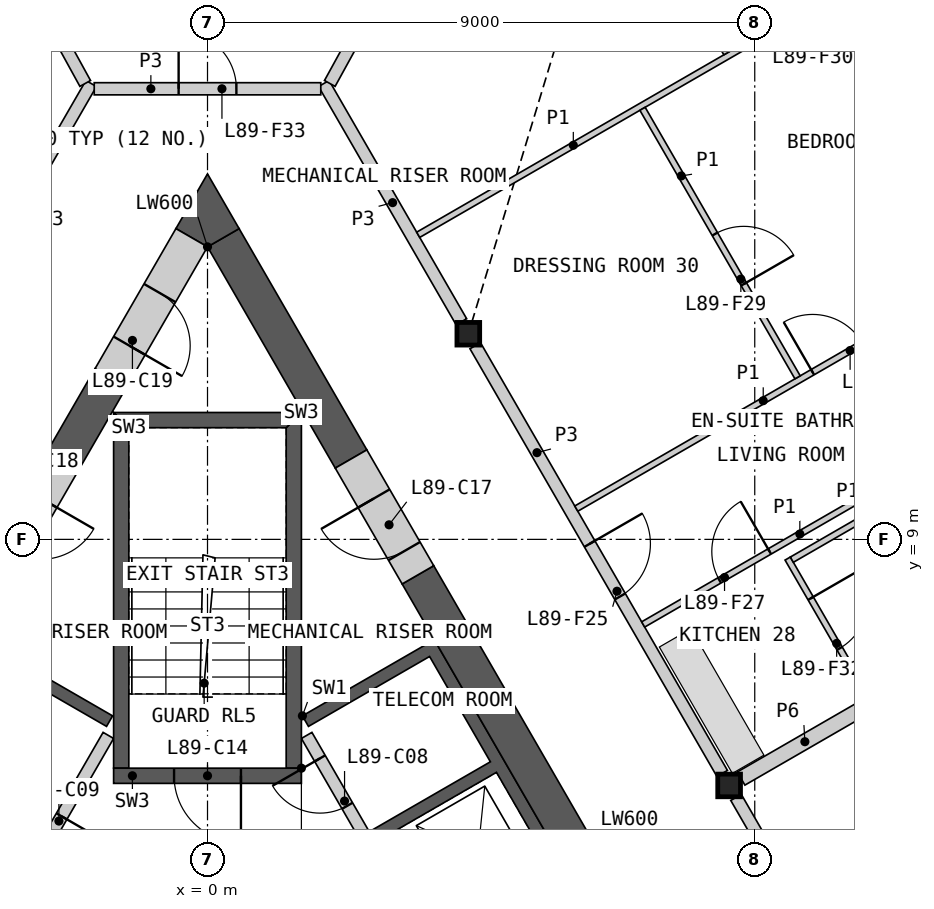
"""IFC4 building model, lengths in metres.
Left out: names, types, materials, properties, quantities, classifications, styles, units other than length and angle.
Written with IfcOpenShell. Run it as: python <this file> out.ifc"""

import sys

from ifc_helpers import new_model, si_unit, direction, frame, frame_2d, origin, origin_2d, place, context, subcontext, project, spatial, polyline, rectangle, i_section, outline, extrude, element, fill, save


model = new_model("IFC4")
c1 = context("Model", 3, precision=1e-05, world=origin(), true_north=direction((0.0, 1.0)))
c2 = subcontext(c1, "Body", "Model", "MODEL_VIEW")
j1 = project(units=[si_unit("LENGTHUNIT", "METRE"), si_unit("PLANEANGLEUNIT", "RADIAN")], contexts=[c1])
p1 = place(None, origin())
s1 = spatial("IfcSite", under=j1, at=p1, CompositionType="ELEMENT")
p2 = place(p1, origin())
s2 = spatial("IfcBuilding", under=s1, at=p2, CompositionType="ELEMENT")
p3 = place(p2, frame((0.0, 0.0, 391.6)))
s3 = spatial("IfcBuildingStorey", under=s2, at=p3, CompositionType="ELEMENT", Elevation=391.6)
for number, where, z_axis, x_axis in (
    (1, (8.578, 4.953, 0.0), (0.0, 0.0, 1.0), (1.0, 0.0, 0.0)),
    (2, (4.289, 12.382, 0.0), (0.0, 0.0, 1.0), (1.0, 0.0, 0.0)),
):
    element("IfcColumn", number, at=place(p3, frame(where, z_axis=z_axis, x_axis=x_axis)), inside=s3, PredefinedType="COLUMN", context=c2, shape_type="SweptSolid", body=[
        extrude(i_section(OverallWidth=0.374, OverallDepth=0.372, WebThickness=0.016, FlangeThickness=0.026, at=origin_2d()), origin(), (0.0, 0.0, 1.0), 3.4),
    ])
p4 = place(p3, origin())
e3 = element("IfcWall", 3, at=p4, inside=s3, PredefinedType="SHEAR", context=c2, shape_type="SweptSolid", body=[
    extrude(outline(polyline([(1.561, 6.097), (3.731, 7.35), (8.231, -0.444), (6.061, -1.697), (5.96, -1.524), (7.952, -0.374), (6.952, 1.358), (4.96, 0.208), (4.861, 0.381), (6.852, 1.531), (5.852, 3.263), (3.861, 2.113), (3.76, 2.287), (5.752, 3.437), (4.752, 5.169), (2.76, 4.019), (2.66, 4.192), (4.652, 5.342), (3.652, 7.074), (1.66, 5.924), (1.561, 6.097)])), origin(), (0.0, 0.0, 1.0), 3.1),
])
p5 = place(p3, frame((5.817, -1.476, 0.0), z_axis=(0.0, 0.0, 1.0), x_axis=(-0.500002616675, 0.866023893041, 0.0)))
e4 = element("IfcWall", 4, at=p5, inside=s3, PredefinedType="SOLIDWALL", context=c2, shape_type="SweptSolid", body=[
    extrude(rectangle(XDim=8.373, YDim=0.2, at=frame_2d((4.187, 0.0))), origin(), (0.0, 0.0, 1.0), 3.1),
])
p6 = place(p5, frame((0.337, 0.0, 0.0)))
e5 = element("IfcOpeningElement", 5, at=p6, cuts=e4, PredefinedType="OPENING", context=c2, shape_type="SweptSolid", body=[
    extrude(rectangle(XDim=1.1, YDim=2.1, at=frame_2d((0.55, 1.05))), frame((0.0, 0.11, 0.0), z_axis=(0.0, -1.0, 0.0), x_axis=(1.0, 0.0, 0.0)), (0.0, 0.0, 1.0), 0.22),
])
p7 = place(p5, frame((2.537, 0.0, 0.0)))
e6 = element("IfcOpeningElement", 6, at=p7, cuts=e4, PredefinedType="OPENING", context=c2, shape_type="SweptSolid", body=[
    extrude(rectangle(XDim=1.1, YDim=2.1, at=frame_2d((0.55, 1.05))), frame((0.0, 0.11, 0.0), z_axis=(0.0, -1.0, 0.0), x_axis=(1.0, 0.0, 0.0)), (0.0, 0.0, 1.0), 0.22),
])
p8 = place(p5, frame((4.737, 0.0, 0.0)))
e7 = element("IfcOpeningElement", 7, at=p8, cuts=e4, PredefinedType="OPENING", context=c2, shape_type="SweptSolid", body=[
    extrude(rectangle(XDim=1.1, YDim=2.1, at=frame_2d((0.55, 1.05))), frame((0.0, 0.11, 0.0), z_axis=(0.0, -1.0, 0.0), x_axis=(1.0, 0.0, 0.0)), (0.0, 0.0, 1.0), 0.22),
])
p9 = place(p5, frame((7.037, 0.0, 0.0)))
e8 = element("IfcOpeningElement", 8, at=p9, cuts=e4, PredefinedType="OPENING", context=c2, shape_type="SweptSolid", body=[
    extrude(rectangle(XDim=0.9, YDim=2.1, at=frame_2d((0.45, 1.05))), frame((0.0, 0.11, 0.0), z_axis=(0.0, -1.0, 0.0), x_axis=(1.0, 0.0, 0.0)), (0.0, 0.0, 1.0), 0.22),
])
p10 = place(p3, origin())
e9 = element("IfcWall", 9, at=p10, inside=s3, PredefinedType="SHEAR", context=c2, shape_type="SweptSolid", body=[
    extrude(outline(polyline([(-4.96, 0.208), (-7.131, 1.461), (-3.731, 7.35), (-1.561, 6.097), (-1.66, 5.924), (-3.652, 7.074), (-5.752, 3.437), (-3.76, 2.287), (-3.861, 2.113), (-5.852, 3.263), (-6.852, 1.531), (-4.861, 0.381), (-4.96, 0.208)])), origin(), (0.0, 0.0, 1.0), 3.1),
])
p11 = place(p3, frame((-1.631, 5.776, 0.0), z_axis=(0.0, 0.0, 1.0), x_axis=(-0.499992876559, -0.866029516466, 0.0)))
e10 = element("IfcWall", 10, at=p11, inside=s3, PredefinedType="SOLIDWALL", context=c2, shape_type="SweptSolid", body=[
    extrude(rectangle(XDim=6.486, YDim=0.2, at=frame_2d((3.243, 0.0))), origin(), (0.0, 0.0, 1.0), 3.1),
])
p12 = place(p11, frame((1.537, 0.0, 0.0)))
e11 = element("IfcOpeningElement", 11, at=p12, cuts=e10, PredefinedType="OPENING", context=c2, shape_type="SweptSolid", body=[
    extrude(rectangle(XDim=0.9, YDim=2.1, at=frame_2d((0.45, 1.05))), frame((0.0, 0.11, 0.0), z_axis=(0.0, -1.0, 0.0), x_axis=(1.0, 0.0, 0.0)), (0.0, 0.0, 1.0), 0.22),
])
p13 = place(p11, frame((4.837, 0.0, 0.0)))
e12 = element("IfcOpeningElement", 12, at=p13, cuts=e10, PredefinedType="OPENING", context=c2, shape_type="SweptSolid", body=[
    extrude(rectangle(XDim=0.9, YDim=2.1, at=frame_2d((0.45, 1.05))), frame((0.0, 0.11, 0.0), z_axis=(0.0, -1.0, 0.0), x_axis=(1.0, 0.0, 0.0)), (0.0, 0.0, 1.0), 0.22),
])
p14 = place(p3, origin())
e13 = element("IfcWall", 13, at=p14, inside=s3, PredefinedType="SHEAR", context=c2, shape_type="SweptSolid", body=[
    extrude(outline(polyline([(1.544, 5.237), (1.544, 11.087), (1.294, 10.837), (1.294, 5.237), (1.544, 5.237)])), origin(), (0.0, 0.0, 1.0), 3.1),
])
p15 = place(p3, origin())
e14 = element("IfcWall", 14, at=p15, inside=s3, PredefinedType="SHEAR", context=c2, shape_type="SweptSolid", body=[
    extrude(outline(polyline([(1.544, 11.087), (-1.544, 11.087), (-1.294, 10.837), (1.294, 10.837), (1.544, 11.087)])), origin(), (0.0, 0.0, 1.0), 3.1),
])
p16 = place(p3, origin())
e15 = element("IfcWall", 15, at=p16, inside=s3, PredefinedType="SHEAR", context=c2, shape_type="SweptSolid", body=[
    extrude(outline(polyline([(-1.294, 10.837), (-1.544, 11.087), (-1.544, 5.237), (-1.294, 5.237), (-1.294, 10.837)])), origin(), (0.0, 0.0, 1.0), 3.1),
])
p17 = place(p3, frame((1.544, 5.112, 0.0), z_axis=(0.0, 0.0, 1.0), x_axis=(-1.0, 0.0, 0.0)))
e16 = element("IfcWall", 16, at=p17, inside=s3, PredefinedType="SHEAR", context=c2, shape_type="SweptSolid", body=[
    extrude(rectangle(XDim=3.088, YDim=0.25, at=frame_2d((1.544, 0.0))), origin(), (0.0, 0.0, 1.0), 3.1),
])
p18 = place(p17, frame((0.994, 0.0, 0.0)))
e17 = element("IfcOpeningElement", 17, at=p18, cuts=e16, PredefinedType="OPENING", context=c2, shape_type="SweptSolid", body=[
    extrude(rectangle(XDim=1.1, YDim=2.1, at=frame_2d((0.55, 1.05))), frame((0.0, 0.135, 0.0), z_axis=(0.0, -1.0, 0.0), x_axis=(1.0, 0.0, 0.0)), (0.0, 0.0, 1.0), 0.27),
])
p19 = place(p3, frame((8.686, -0.634, 0.0), z_axis=(0.0, 0.0, 1.0), x_axis=(-0.50001836461, 0.866014800712, 0.0)))
e18 = element("IfcWall", 18, at=p19, inside=s3, PredefinedType="SHEAR", context=c2, shape_type="SweptSolid", body=[
    extrude(rectangle(XDim=10.451, YDim=0.6, at=frame_2d((5.225, 0.0))), origin(), (0.0, 0.0, 1.0), 3.1),
])
p20 = place(p3, frame((2.361, 10.322, 0.0), z_axis=(0.0, 0.0, 1.0), x_axis=(-0.500000735859, 0.866024978935, 0.0)))
e19 = element("IfcWall", 19, at=p20, inside=s3, PredefinedType="SHEAR", context=c2, shape_type="SweptSolid", body=[
    extrude(rectangle(XDim=4.202, YDim=0.6, at=frame_2d((2.101, 0.0))), origin(), (0.0, 0.0, 1.0), 3.1),
])
p21 = place(p3, frame((-1.59, 11.658, 0.0), z_axis=(0.0, 0.0, 1.0), x_axis=(-0.500037594623, -0.866003697431, 0.0)))
e20 = element("IfcWall", 20, at=p21, inside=s3, PredefinedType="SHEAR", context=c2, shape_type="SweptSolid", body=[
    extrude(rectangle(XDim=1.542, YDim=0.6, at=frame_2d((0.771, 0.0))), origin(), (0.0, 0.0, 1.0), 3.1),
])
p22 = place(p3, origin())
e21 = element("IfcWall", 21, at=p22, inside=s3, PredefinedType="SHEAR", context=c2, shape_type="SweptSolid", body=[
    extrude(outline(polyline([(0.0, 13.811), (-0.52, 14.111), (0.0, 15.011), (0.52, 14.111), (0.0, 13.811)])), origin(), (0.0, 0.0, 1.0), 3.1),
])
p23 = place(p3, frame((3.461, 8.417, 0.0), z_axis=(0.0, 0.0, 1.0), x_axis=(-0.499946605688, 0.86605622881, 0.0)))
e22 = element("IfcWall", 22, at=p23, inside=s3, PredefinedType="SHEAR", context=c2, shape_type="SweptSolid", body=[
    extrude(rectangle(XDim=2.2, YDim=0.6, at=frame_2d((1.1, 0.0))), origin(), (0.0, 0.0, 1.0), 3.1),
])
p24 = place(p23, frame((0.45, 0.0, 0.0)))
e23 = element("IfcOpeningElement", 23, at=p24, cuts=e22, PredefinedType="OPENING", context=c2, shape_type="SweptSolid", body=[
    extrude(rectangle(XDim=1.0, YDim=2.1, at=frame_2d((0.5, 1.05))), frame((0.0, 0.31, 0.0), z_axis=(0.0, -1.0, 0.0), x_axis=(1.0, 0.0, 0.0)), (0.0, 0.0, 1.0), 0.62),
])
p25 = place(p3, frame((-2.361, 10.322, 0.0), z_axis=(0.0, 0.0, 1.0), x_axis=(-0.499946605688, -0.86605622881, 0.0)))
e24 = element("IfcWall", 24, at=p25, inside=s3, PredefinedType="SHEAR", context=c2, shape_type="SweptSolid", body=[
    extrude(rectangle(XDim=2.2, YDim=0.6, at=frame_2d((1.1, 0.0))), origin(), (0.0, 0.0, 1.0), 3.1),
])
p26 = place(p25, frame((0.75, 0.0, 0.0)))
e25 = element("IfcOpeningElement", 25, at=p26, cuts=e24, PredefinedType="OPENING", context=c2, shape_type="SweptSolid", body=[
    extrude(rectangle(XDim=1.0, YDim=2.1, at=frame_2d((0.5, 1.05))), frame((0.0, 0.31, 0.0), z_axis=(0.0, -1.0, 0.0), x_axis=(1.0, 0.0, 0.0)), (0.0, 0.0, 1.0), 0.62),
])
p27 = place(p3, frame((-0.26, 13.961, 0.0), z_axis=(0.0, 0.0, 1.0), x_axis=(-0.49997936161, -0.866037319036, 0.0)))
e26 = element("IfcWall", 26, at=p27, inside=s3, PredefinedType="SHEAR", context=c2, shape_type="SweptSolid", body=[
    extrude(rectangle(XDim=2.66, YDim=0.6, at=frame_2d((1.33, 0.0))), origin(), (0.0, 0.0, 1.0), 3.1),
])
p28 = place(p27, frame((1.05, 0.0, 0.0)))
e27 = element("IfcOpeningElement", 27, at=p28, cuts=e26, PredefinedType="OPENING", context=c2, shape_type="SweptSolid", body=[
    extrude(rectangle(XDim=1.0, YDim=2.1, at=frame_2d((0.5, 1.05))), frame((0.0, 0.31, 0.0), z_axis=(0.0, -1.0, 0.0), x_axis=(1.0, 0.0, 0.0)), (0.0, 0.0, 1.0), 0.62),
])
p29 = place(p3, frame((4.403, 12.185, 0.0), z_axis=(0.0, 0.0, 1.0), x_axis=(0.499992155518, -0.866029932751, 0.0)))
e28 = element("IfcWall", 28, at=p29, inside=s3, PredefinedType="PARTITIONING", context=c2, shape_type="SweptSolid", body=[
    extrude(rectangle(XDim=8.123, YDim=0.2, at=frame_2d((4.062, 0.0))), origin(), (0.0, 0.0, 1.0), 3.1),
])
p30 = place(p29, frame((3.762, 0.0, 0.0)))
e29 = element("IfcOpeningElement", 29, at=p30, cuts=e28, PredefinedType="OPENING", context=c2, shape_type="SweptSolid", body=[
    extrude(rectangle(XDim=1.0, YDim=2.1, at=frame_2d((0.5, 1.05))), frame((0.0, 0.11, 0.0), z_axis=(0.0, -1.0, 0.0), x_axis=(1.0, 0.0, 0.0)), (0.0, 0.0, 1.0), 0.22),
])
p31 = place(p3, frame((8.692, 4.756, 0.0), z_axis=(0.0, 0.0, 1.0), x_axis=(0.500001682468, -0.866024432409, 0.0)))
e30 = element("IfcWall", 30, at=p31, inside=s3, PredefinedType="PARTITIONING", context=c2, shape_type="SweptSolid", body=[
    extrude(rectangle(XDim=8.124, YDim=0.2, at=frame_2d((4.062, 0.0))), origin(), (0.0, 0.0, 1.0), 3.1),
])
p32 = place(p31, frame((1.956, 0.0, 0.0)))
e31 = element("IfcOpeningElement", 31, at=p32, cuts=e30, PredefinedType="OPENING", context=c2, shape_type="SweptSolid", body=[
    extrude(rectangle(XDim=1.0, YDim=2.1, at=frame_2d((0.5, 1.05))), frame((0.0, 0.11, 0.0), z_axis=(0.0, -1.0, 0.0), x_axis=(1.0, 0.0, 0.0)), (0.0, 0.0, 1.0), 0.22),
])
for number, where, z_axis, x_axis in (
    (32, (-4.176, 12.579, 0.0), (0.0, 0.0, 1.0), (0.5, 0.866, 0.0)),
    (33, (1.913, 16.498, 0.0), (0.0, 0.0, 1.0), (0.5, -0.866, 0.0)),
):
    element("IfcWall", number, at=place(p3, frame(where, z_axis=z_axis, x_axis=x_axis)), inside=s3, PredefinedType="PARTITIONING", context=c2, shape_type="SweptSolid", body=[
        extrude(rectangle(XDim=4.525, YDim=0.2, at=frame_2d((2.263, 0.0))), origin(), (0.0, 0.0, 1.0), 3.1),
    ])
p33 = place(p3, frame((-1.863, 16.411, 0.0), z_axis=(0.0, 0.0, 1.0), x_axis=(1.0, 0.0, 0.0)))
e34 = element("IfcWall", 34, at=p33, inside=s3, PredefinedType="PARTITIONING", context=c2, shape_type="SweptSolid", body=[
    extrude(rectangle(XDim=3.726, YDim=0.2, at=frame_2d((1.863, 0.0))), origin(), (0.0, 0.0, 1.0), 3.1),
])
p34 = place(p33, frame((1.388, 0.0, 0.0)))
e35 = element("IfcOpeningElement", 35, at=p34, cuts=e34, PredefinedType="OPENING", context=c2, shape_type="SweptSolid", body=[
    extrude(rectangle(XDim=0.95, YDim=2.1, at=frame_2d((0.475, 1.05))), frame((0.0, 0.11, 0.0), z_axis=(0.0, -1.0, 0.0), x_axis=(1.0, 0.0, 0.0)), (0.0, 0.0, 1.0), 0.22),
])
p35 = place(p3, frame((8.775, 5.066, 0.0), z_axis=(0.0, 0.0, 1.0), x_axis=(0.865989219354, 0.500062668036, 0.0)))
e36 = element("IfcWall", 36, at=p35, inside=s3, PredefinedType="PARTITIONING", context=c2, shape_type="SweptSolid", body=[
    extrude(rectangle(XDim=2.423, YDim=0.25, at=frame_2d((1.211, 0.0))), origin(), (0.0, 0.0, 1.0), 2.33),
])
p36 = place(p3, frame((-8.581, 28.455, 0.0), z_axis=(0.0, 0.0, 1.0), x_axis=(0.481551865547, -0.876417594979, 0.0)))
e37 = element("IfcWall", 37, at=p36, inside=s3, PredefinedType="PARTITIONING", context=c2, shape_type="SweptSolid", body=[
    extrude(rectangle(XDim=13.643, YDim=0.2, at=frame_2d((6.821, 0.0))), origin(), (0.0, 0.0, 1.0), 2.33),
])
p37 = place(p3, frame((2.011, 16.499, 0.0), z_axis=(0.0, 0.0, 1.0), x_axis=(0.481548701843, 0.876419333284, 0.0)))
e38 = element("IfcWall", 38, at=p37, inside=s3, PredefinedType="PARTITIONING", context=c2, shape_type="SweptSolid", body=[
    extrude(rectangle(XDim=14.032, YDim=0.2, at=frame_2d((7.016, 0.0))), origin(), (0.0, 0.0, 1.0), 2.33),
])
p38 = place(p3, frame((3.465, 14.01, 0.0), z_axis=(0.0, 0.0, 1.0), x_axis=(0.866032376801, 0.499987922186, 0.0)))
e39 = element("IfcWall", 39, at=p38, inside=s3, PredefinedType="PARTITIONING", context=c2, shape_type="SweptSolid", body=[
    extrude(rectangle(XDim=11.782, YDim=0.1, at=frame_2d((5.891, 0.0))), origin(), (0.0, 0.0, 1.0), 2.33),
])
p39 = place(p38, frame((6.168, 0.0, 0.0)))
e40 = element("IfcOpeningElement", 40, at=p39, cuts=e39, PredefinedType="OPENING", context=c2, shape_type="SweptSolid", body=[
    extrude(rectangle(XDim=0.95, YDim=2.1, at=frame_2d((0.475, 1.05))), frame((0.0, 0.06, 0.0), z_axis=(0.0, -1.0, 0.0), x_axis=(1.0, 0.0, 0.0)), (0.0, 0.0, 1.0), 0.12),
])
p40 = place(p3, frame((6.065, 9.506, 0.0), z_axis=(0.0, 0.0, 1.0), x_axis=(0.866018949465, 0.500011179042, 0.0)))
e41 = element("IfcWall", 41, at=p40, inside=s3, PredefinedType="PARTITIONING", context=c2, shape_type="SweptSolid", body=[
    extrude(rectangle(XDim=7.1, YDim=0.1, at=frame_2d((3.55, 0.0))), origin(), (0.0, 0.0, 1.0), 2.33),
])
p41 = place(p40, frame((4.488, 0.0, 0.0)))
e42 = element("IfcOpeningElement", 42, at=p41, cuts=e41, PredefinedType="OPENING", context=c2, shape_type="SweptSolid", body=[
    extrude(rectangle(XDim=0.95, YDim=2.1, at=frame_2d((0.475, 1.05))), frame((0.0, 0.06, 0.0), z_axis=(0.0, -1.0, 0.0), x_axis=(1.0, 0.0, 0.0)), (0.0, 0.0, 1.0), 0.12),
])
p42 = place(p3, frame((5.417, 22.394, 0.0), z_axis=(0.0, 0.0, 1.0), x_axis=(0.499975529996, -0.866039531087, 0.0)))
e43 = element("IfcWall", 43, at=p42, inside=s3, PredefinedType="PARTITIONING", context=c2, shape_type="SweptSolid", body=[
    extrude(rectangle(XDim=6.235, YDim=0.1, at=frame_2d((3.118, 0.0))), origin(), (0.0, 0.0, 1.0), 2.33),
])
p43 = place(p42, frame((1.777, 0.0, 0.0)))
e44 = element("IfcOpeningElement", 44, at=p43, cuts=e43, PredefinedType="OPENING", context=c2, shape_type="SweptSolid", body=[
    extrude(rectangle(XDim=0.95, YDim=2.1, at=frame_2d((0.475, 1.05))), frame((0.0, 0.06, 0.0), z_axis=(0.0, -1.0, 0.0), x_axis=(1.0, 0.0, 0.0)), (0.0, 0.0, 1.0), 0.12),
])
p44 = place(p3, frame((7.165, 7.601, 0.0), z_axis=(0.0, 0.0, 1.0), x_axis=(0.866017493347, 0.500013701029, 0.0)))
e45 = element("IfcWall", 45, at=p44, inside=s3, PredefinedType="PARTITIONING", context=c2, shape_type="SweptSolid", body=[
    extrude(rectangle(XDim=5.95, YDim=0.1, at=frame_2d((2.975, 0.0))), origin(), (0.0, 0.0, 1.0), 2.33),
])
p45 = place(p44, frame((1.45, 0.0, 0.0)))
e46 = element("IfcOpeningElement", 46, at=p45, cuts=e45, PredefinedType="OPENING", context=c2, shape_type="SweptSolid", body=[
    extrude(rectangle(XDim=0.95, YDim=2.1, at=frame_2d((0.475, 1.05))), frame((0.0, 0.06, 0.0), z_axis=(0.0, -1.0, 0.0), x_axis=(1.0, 0.0, 0.0)), (0.0, 0.0, 1.0), 0.12),
])
p46 = place(p3, frame((9.542, 8.684, 0.0), z_axis=(0.0, 0.0, 1.0), x_axis=(0.499996545922, -0.866027397988, 0.0)))
e47 = element("IfcWall", 47, at=p46, inside=s3, PredefinedType="PARTITIONING", context=c2, shape_type="SweptSolid", body=[
    extrude(rectangle(XDim=5.5, YDim=0.1, at=frame_2d((2.75, 0.0))), origin(), (0.0, 0.0, 1.0), 2.33),
])
p47 = place(p46, frame((0.756, 0.0, 0.0)))
e48 = element("IfcOpeningElement", 48, at=p47, cuts=e47, PredefinedType="OPENING", context=c2, shape_type="SweptSolid", body=[
    extrude(rectangle(XDim=0.95, YDim=2.1, at=frame_2d((0.475, 1.05))), frame((0.0, 0.06, 0.0), z_axis=(0.0, -1.0, 0.0), x_axis=(1.0, 0.0, 0.0)), (0.0, 0.0, 1.0), 0.12),
])
p48 = place(p3, frame((7.154, 16.082, 0.0), z_axis=(0.0, 0.0, 1.0), x_axis=(0.499984882974, -0.866034131428, 0.0)))
e49 = element("IfcWall", 49, at=p48, inside=s3, PredefinedType="PARTITIONING", context=c2, shape_type="SweptSolid", body=[
    extrude(rectangle(XDim=5.1, YDim=0.1, at=frame_2d((2.55, 0.0))), origin(), (0.0, 0.0, 1.0), 2.33),
])
p49 = place(p48, frame((2.379, 0.0, 0.0)))
e50 = element("IfcOpeningElement", 50, at=p49, cuts=e49, PredefinedType="OPENING", context=c2, shape_type="SweptSolid", body=[
    extrude(rectangle(XDim=0.95, YDim=2.1, at=frame_2d((0.475, 1.05))), frame((0.0, 0.06, 0.0), z_axis=(0.0, -1.0, 0.0), x_axis=(1.0, 0.0, 0.0)), (0.0, 0.0, 1.0), 0.12),
])
p50 = place(p3, frame((9.61, 8.666, 0.0), z_axis=(0.0, 0.0, 1.0), x_axis=(0.86599734893, 0.500048589285, 0.0)))
e51 = element("IfcWall", 51, at=p50, inside=s3, PredefinedType="PARTITIONING", context=c2, shape_type="SweptSolid", body=[
    extrude(rectangle(XDim=2.7, YDim=0.1, at=frame_2d((1.35, 0.0))), origin(), (0.0, 0.0, 1.0), 2.33),
])
p51 = place(p9, origin())
e52 = element("IfcDoor", 52, at=p51, inside=s3, OperationType="SINGLE_SWING_RIGHT", PredefinedType="DOOR", context=c2, shape_type="SweptSolid", body=[
    extrude(rectangle(XDim=0.9, YDim=2.1, at=frame_2d((0.45, 1.05))), frame((0.0, 0.025, 0.0), z_axis=(0.0, -1.0, 0.0), x_axis=(1.0, 0.0, 0.0)), (0.0, 0.0, 1.0), 0.05),
])
fill(e8, e52)
p52 = place(p12, origin())
e53 = element("IfcDoor", 53, at=p52, inside=s3, OperationType="SINGLE_SWING_LEFT", PredefinedType="DOOR", context=c2, shape_type="SweptSolid", body=[
    extrude(rectangle(XDim=0.9, YDim=2.1, at=frame_2d((0.45, 1.05))), frame((0.0, 0.025, 0.0), z_axis=(0.0, -1.0, 0.0), x_axis=(1.0, 0.0, 0.0)), (0.0, 0.0, 1.0), 0.05),
])
fill(e11, e53)
p53 = place(p18, origin())
e54 = element("IfcDoor", 54, at=p53, inside=s3, OperationType="SINGLE_SWING_LEFT", PredefinedType="DOOR", context=c2, shape_type="SweptSolid", body=[
    extrude(rectangle(XDim=1.1, YDim=2.1, at=frame_2d((0.55, 1.05))), frame((0.0, 0.025, 0.0), z_axis=(0.0, -1.0, 0.0), x_axis=(1.0, 0.0, 0.0)), (0.0, 0.0, 1.0), 0.05),
])
fill(e17, e54)
p54 = place(p24, origin())
e55 = element("IfcDoor", 55, at=p54, inside=s3, OperationType="SINGLE_SWING_RIGHT", PredefinedType="DOOR", context=c2, shape_type="SweptSolid", body=[
    extrude(rectangle(XDim=1.0, YDim=2.1, at=frame_2d((0.5, 1.05))), frame((0.0, 0.055, 0.0), z_axis=(0.0, -1.0, 0.0), x_axis=(1.0, 0.0, 0.0)), (0.0, 0.0, 1.0), 0.05),
])
fill(e23, e55)
p55 = place(p28, origin())
e56 = element("IfcDoor", 56, at=p55, inside=s3, OperationType="SINGLE_SWING_RIGHT", PredefinedType="DOOR", context=c2, shape_type="SweptSolid", body=[
    extrude(rectangle(XDim=1.0, YDim=2.1, at=frame_2d((0.5, 1.05))), frame((0.0, 0.055, 0.0), z_axis=(0.0, -1.0, 0.0), x_axis=(1.0, 0.0, 0.0)), (0.0, 0.0, 1.0), 0.05),
])
fill(e27, e56)
p56 = place(p30, origin())
e57 = element("IfcDoor", 57, at=p56, inside=s3, OperationType="SINGLE_SWING_LEFT", PredefinedType="DOOR", context=c2, shape_type="SweptSolid", body=[
    extrude(rectangle(XDim=1.0, YDim=2.1, at=frame_2d((0.5, 1.05))), frame((0.0, 0.025, 0.0), z_axis=(0.0, -1.0, 0.0), x_axis=(1.0, 0.0, 0.0)), (0.0, 0.0, 1.0), 0.05),
])
fill(e29, e57)
p57 = place(p45, origin())
e58 = element("IfcDoor", 58, at=p57, inside=s3, OperationType="SINGLE_SWING_RIGHT", PredefinedType="DOOR", context=c2, shape_type="SweptSolid", body=[
    extrude(rectangle(XDim=0.95, YDim=2.1, at=frame_2d((0.475, 1.05))), frame((0.0, 0.025, 0.0), z_axis=(0.0, -1.0, 0.0), x_axis=(1.0, 0.0, 0.0)), (0.0, 0.0, 1.0), 0.05),
])
fill(e46, e58)
p58 = place(p41, origin())
e59 = element("IfcDoor", 59, at=p58, inside=s3, OperationType="SINGLE_SWING_LEFT", PredefinedType="DOOR", context=c2, shape_type="SweptSolid", body=[
    extrude(rectangle(XDim=0.95, YDim=2.1, at=frame_2d((0.475, 1.05))), frame((0.0, 0.025, 0.0), z_axis=(0.0, -1.0, 0.0), x_axis=(1.0, 0.0, 0.0)), (0.0, 0.0, 1.0), 0.05),
])
fill(e42, e59)
p59 = place(p49, origin())
e60 = element("IfcDoor", 60, at=p59, inside=s3, OperationType="SINGLE_SWING_RIGHT", PredefinedType="DOOR", context=c2, shape_type="SweptSolid", body=[
    extrude(rectangle(XDim=0.95, YDim=2.1, at=frame_2d((0.475, 1.05))), frame((0.0, 0.025, 0.0), z_axis=(0.0, -1.0, 0.0), x_axis=(1.0, 0.0, 0.0)), (0.0, 0.0, 1.0), 0.05),
])
fill(e50, e60)
p60 = place(p47, origin())
e61 = element("IfcDoor", 61, at=p60, inside=s3, OperationType="SINGLE_SWING_LEFT", PredefinedType="DOOR", context=c2, shape_type="SweptSolid", body=[
    extrude(rectangle(XDim=0.95, YDim=2.1, at=frame_2d((0.475, 1.05))), frame((0.0, 0.025, 0.0), z_axis=(0.0, -1.0, 0.0), x_axis=(1.0, 0.0, 0.0)), (0.0, 0.0, 1.0), 0.05),
])
fill(e48, e61)
p61 = place(p34, origin())
e62 = element("IfcDoor", 62, at=p61, inside=s3, OperationType="SINGLE_SWING_LEFT", PredefinedType="DOOR", context=c2, shape_type="SweptSolid", body=[
    extrude(rectangle(XDim=0.95, YDim=2.1, at=frame_2d((0.475, 1.05))), frame((0.0, 0.025, 0.0), z_axis=(0.0, -1.0, 0.0), x_axis=(1.0, 0.0, 0.0)), (0.0, 0.0, 1.0), 0.05),
])
fill(e35, e62)
save(model, sys.argv[1])
